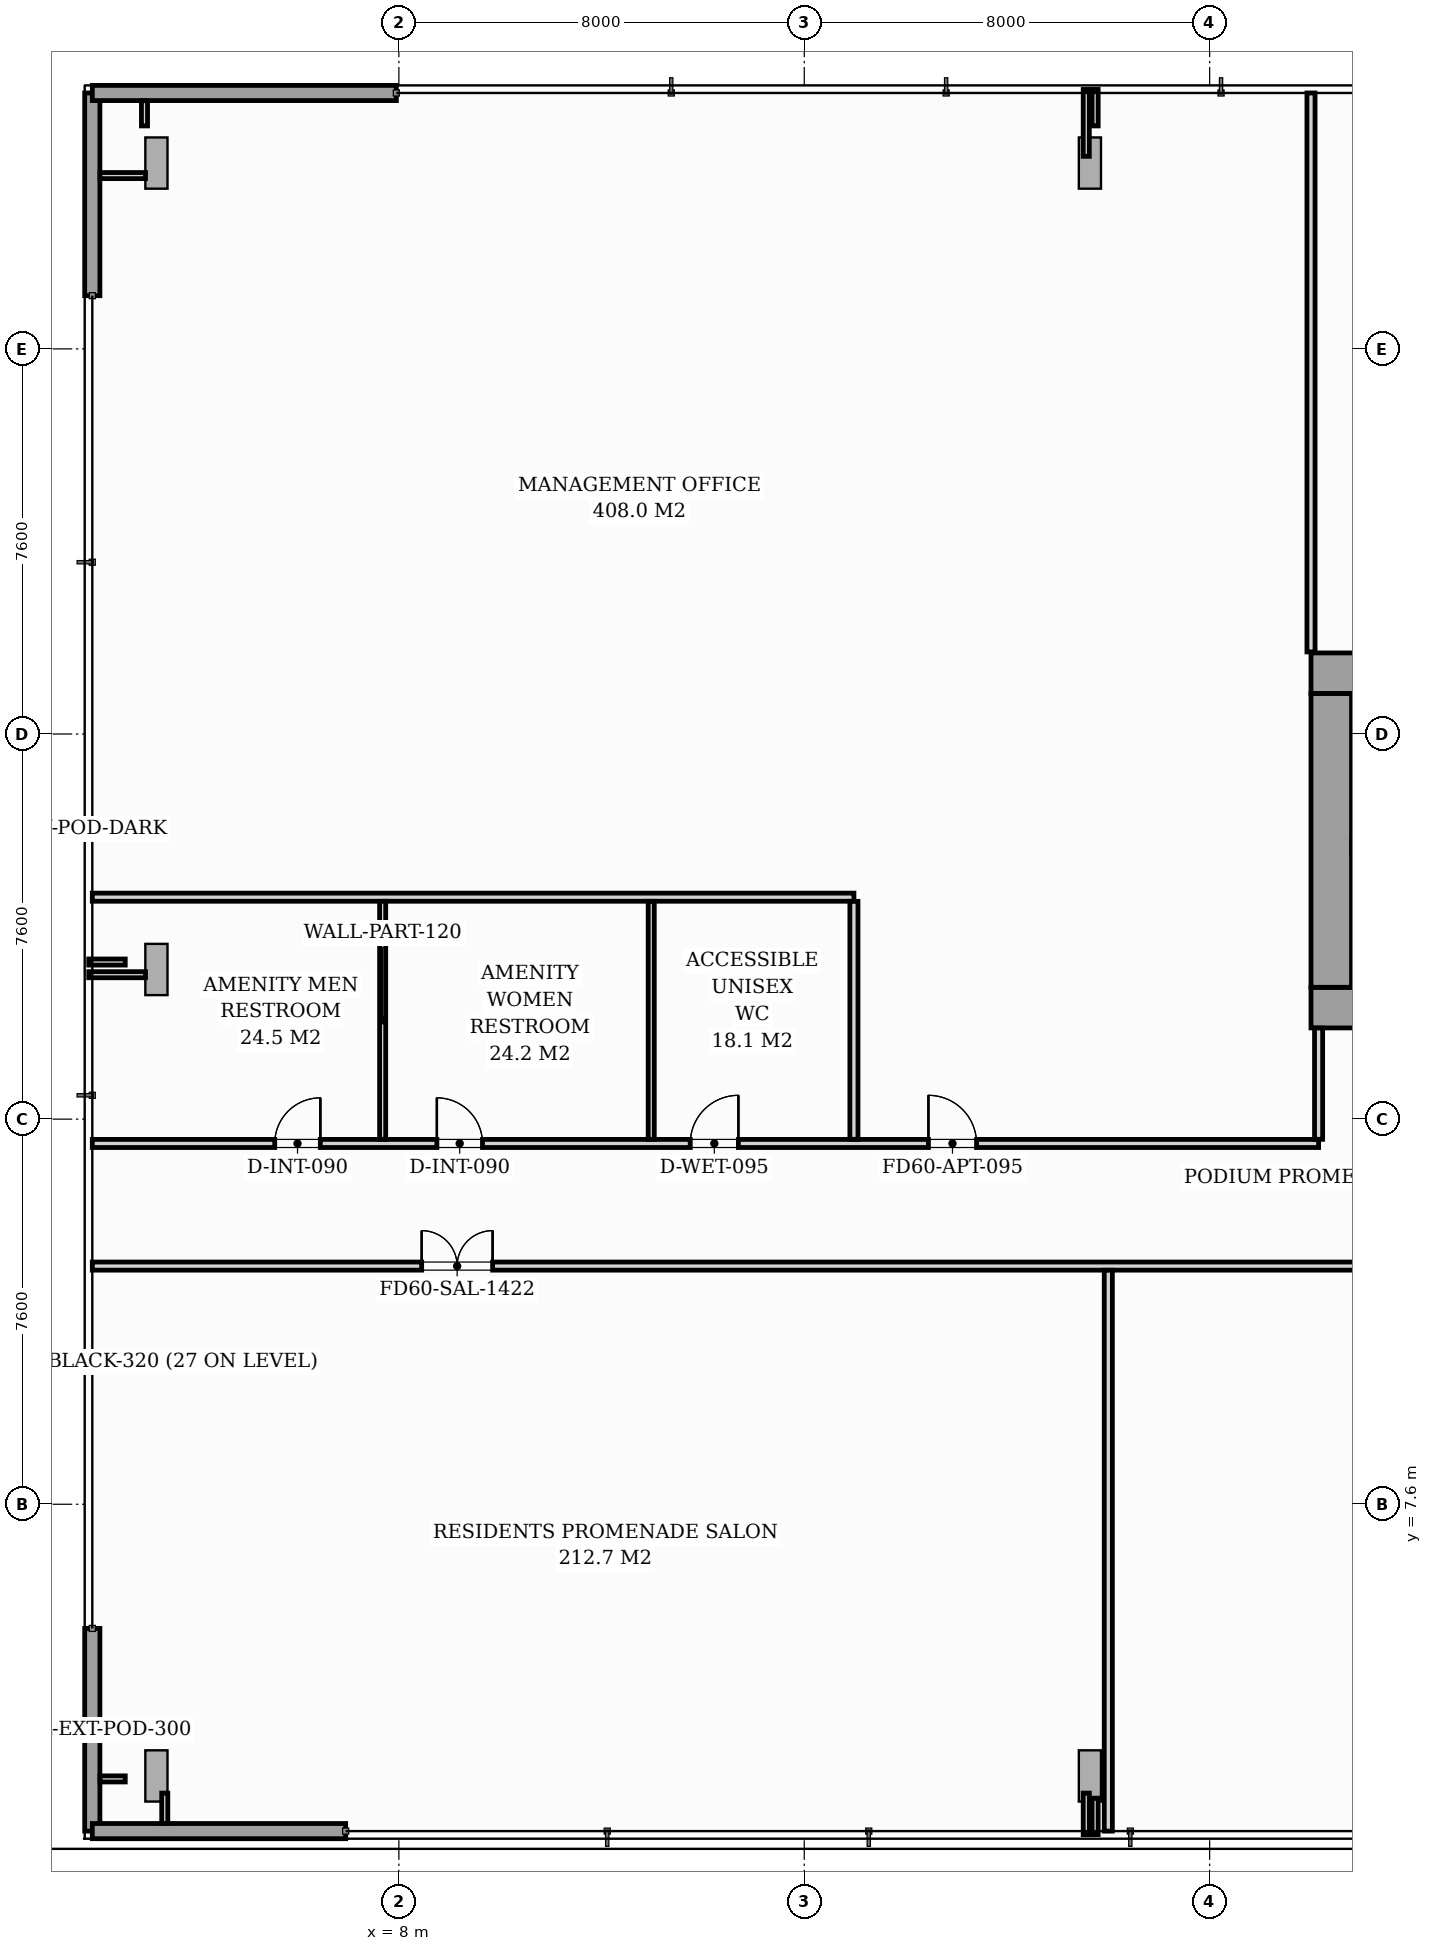
"""IFC4 building model, lengths in metres.
Left out: names, types, materials, properties, quantities, classifications, styles, units other than length and angle.
Written with IfcOpenShell. Run it as: python <this file> out.ifc"""

import sys

from ifc_helpers import new_model, si_unit, direction, frame, frame_2d, origin, origin_2d, place, context, subcontext, project, spatial, rectangle, i_section, extrude, source, transform, mapped, element, fill, save


model = new_model("IFC4")
c1 = context("Model", 3, precision=1e-05, world=origin(), true_north=direction((0.0, 1.0)))
c2 = subcontext(c1, "Body", "Model", "MODEL_VIEW")
j1 = project(units=[si_unit("LENGTHUNIT", "METRE"), si_unit("PLANEANGLEUNIT", "RADIAN")], contexts=[c1])
p1 = place(None, origin())
s1 = spatial("IfcSite", under=j1, at=p1, CompositionType="ELEMENT")
p2 = place(p1, origin())
s2 = spatial("IfcBuilding", under=s1, at=p2, CompositionType="ELEMENT")
p3 = place(p2, frame((0.0, 0.0, 5.0)))
s3 = spatial("IfcBuildingStorey", under=s2, at=p3, CompositionType="ELEMENT", Elevation=5.0)
m1 = source(origin(), c2, "Body", "SweptSolid", [
    extrude(i_section(OverallWidth=0.437, OverallDepth=0.514, WebThickness=0.061, FlangeThickness=0.097, FilletRadius=0.018, at=origin_2d()), origin(), (0.0, 0.0, 1.0), 4.496),
])
for number, where, z_axis, x_axis in (
    (1, (26.4, 17.4, 0.002), (0.0, 0.0, 1.0), (1.0, 0.0, 0.0)),
    (2, (26.4, 24.0, 0.002), (0.0, 0.0, 1.0), (1.0, 0.0, 0.0)),
):
    element("IfcColumn", number, at=place(p3, frame(where, z_axis=z_axis, x_axis=x_axis)), inside=s3, PredefinedType="PILASTER", context=c2, shape_type="MappedRepresentation", body=[
        mapped(m1, transform((0.0, 0.0, 0.0), scale=1.0)),
    ])
m2 = source(origin(), c2, "Body", "SweptSolid", [
    extrude(i_section(OverallWidth=0.438, OverallDepth=1.011, WebThickness=0.041, FlangeThickness=0.074, FilletRadius=0.024, at=origin_2d()), origin(), (0.0, 0.0, 1.0), 4.05),
])
p4 = place(p3, frame((2.991, 2.183, 0.055), z_axis=(0.192259373615, 0.04804977133, 0.980167104494), x_axis=(-0.950919303155, -0.237655278964, 0.198172771257)))
e3 = element("IfcColumn", 3, at=p4, inside=s3, PredefinedType="COLUMN", context=c2, shape_type="MappedRepresentation", body=[
    mapped(m2, transform((0.0, 0.0, 0.0), scale=1.0)),
])
m3 = source(origin(), c2, "Body", "SweptSolid", [
    extrude(i_section(OverallWidth=0.438, OverallDepth=1.011, WebThickness=0.041, FlangeThickness=0.074, FilletRadius=0.024, at=origin_2d()), origin(), (0.0, 0.0, 1.0), 4.032),
])
p5 = place(p3, frame((21.737, 2.182, 0.033), z_axis=(-0.085366370454, 0.048798081266, 0.995153922798), x_axis=(0.863960144879, -0.493866579271, 0.098329395095)))
e4 = element("IfcColumn", 4, at=p5, inside=s3, PredefinedType="COLUMN", context=c2, shape_type="MappedRepresentation", body=[
    mapped(m3, transform((0.0, 0.0, 0.0), scale=1.0)),
])
m4 = source(origin(), c2, "Body", "SweptSolid", [
    extrude(i_section(OverallWidth=0.438, OverallDepth=1.011, WebThickness=0.041, FlangeThickness=0.074, FilletRadius=0.024, at=origin_2d()), origin(), (0.0, 0.0, 1.0), 4.147),
])
p6 = place(p3, frame((2.997, 34.395, 0.085), z_axis=(0.184904801309, -0.277268899766, 0.942831995467), x_axis=(-0.523104384662, 0.784406765921, 0.333268402829)))
e5 = element("IfcColumn", 5, at=p6, inside=s3, PredefinedType="COLUMN", context=c2, shape_type="MappedRepresentation", body=[
    mapped(m4, transform((0.0, 0.0, 0.0), scale=1.0)),
])
m5 = source(origin(), c2, "Body", "SweptSolid", [
    extrude(i_section(OverallWidth=0.438, OverallDepth=1.011, WebThickness=0.041, FlangeThickness=0.074, FilletRadius=0.024, at=origin_2d()), origin(), (0.0, 0.0, 1.0), 4.108),
])
p7 = place(p3, frame((21.733, 34.398, 0.076), z_axis=(-0.08201510328, -0.281228600523, 0.956129696789), x_axis=(0.267686520286, 0.917893198547, 0.292943685574)))
e6 = element("IfcColumn", 6, at=p7, inside=s3, PredefinedType="COLUMN", context=c2, shape_type="MappedRepresentation", body=[
    mapped(m5, transform((0.0, 0.0, 0.0), scale=1.0)),
])
m6 = source(origin(), c2, "Body", "SweptSolid", [
    extrude(i_section(OverallWidth=0.438, OverallDepth=1.011, WebThickness=0.041, FlangeThickness=0.074, FilletRadius=0.024, at=origin_2d()), origin(), (0.0, 0.0, 1.0), 4.062),
])
p8 = place(p3, frame((2.992, 18.292, 0.061), z_axis=(0.191071642999, -0.119367185591, 0.974291076756), x_axis=(-0.826299381934, 0.516209679937, 0.225292915455)))
e7 = element("IfcColumn", 7, at=p8, inside=s3, PredefinedType="COLUMN", context=c2, shape_type="MappedRepresentation", body=[
    mapped(m6, transform((0.0, 0.0, 0.0), scale=1.0)),
])
for number, where, z_axis, x_axis in (
    (8, (1.95, 1.15, 0.0), (0.0, 0.0, 1.0), (0.0, 1.0, 0.0)),
    (9, (1.95, 31.45, 0.0), (0.0, 0.0, 1.0), (0.0, 1.0, 0.0)),
):
    element("IfcWall", number, at=place(p3, frame(where, z_axis=z_axis, x_axis=x_axis)), inside=s3, PredefinedType="STANDARD", context=c2, shape_type="SweptSolid", body=[
        extrude(rectangle(XDim=4.0, YDim=0.3, at=frame_2d((2.0, 0.0))), origin(), (0.0, 0.0, 1.0), 4.08),
    ])
p9 = place(p3, frame((1.95, 35.45, 0.0), z_axis=(0.0, 0.0, 1.0), x_axis=(1.0, 0.0, 0.0)))
e10 = element("IfcWall", 10, at=p9, inside=s3, PredefinedType="STANDARD", context=c2, shape_type="SweptSolid", body=[
    extrude(rectangle(XDim=6.0, YDim=0.3, at=frame_2d((3.0, 0.0))), origin(), (0.0, 0.0, 1.0), 4.08),
])
p10 = place(p3, frame((6.95, 1.15, 0.0), z_axis=(0.0, 0.0, 1.0), x_axis=(-1.0, 0.0, 0.0)))
e11 = element("IfcWall", 11, at=p10, inside=s3, PredefinedType="STANDARD", context=c2, shape_type="SweptSolid", body=[
    extrude(rectangle(XDim=5.0, YDim=0.3, at=frame_2d((2.5, 0.0))), origin(), (0.0, 0.0, 1.0), 4.08),
])
p11 = place(p3, frame((26.0, 17.4, 0.0), z_axis=(0.0, 0.0, 1.0), x_axis=(1.0, 0.0, 0.0)))
e12 = element("IfcWall", 12, at=p11, inside=s3, PredefinedType="SHEAR", context=c2, shape_type="SweptSolid", body=[
    extrude(rectangle(XDim=20.0, YDim=0.8, at=frame_2d((10.0, 0.0))), origin(), (0.0, 0.0, 1.0), 4.5),
])
p12 = place(p11, frame((1.15, 0.0, 0.0)))
e13 = element("IfcOpeningElement", 13, at=p12, cuts=e12, PredefinedType="OPENING", context=c2, shape_type="SweptSolid", body=[
    extrude(rectangle(XDim=0.95, YDim=2.06, at=frame_2d((0.475, 1.03))), frame((0.0, 0.41, 0.0), z_axis=(0.0, -1.0, 0.0), x_axis=(1.0, 0.0, 0.0)), (0.0, 0.0, 1.0), 0.82),
])
p13 = place(p11, frame((9.58, 0.0, 0.0)))
e14 = element("IfcOpeningElement", 14, at=p13, cuts=e12, PredefinedType="OPENING", context=c2, shape_type="SweptSolid", body=[
    extrude(rectangle(XDim=0.9, YDim=2.06, at=frame_2d((0.45, 1.03))), frame((0.0, 0.41, 0.0), z_axis=(0.0, -1.0, 0.0), x_axis=(1.0, 0.0, 0.0)), (0.0, 0.0, 1.0), 0.82),
])
p14 = place(p11, frame((17.75, 0.0, 0.0)))
e15 = element("IfcOpeningElement", 15, at=p14, cuts=e12, PredefinedType="OPENING", context=c2, shape_type="SweptSolid", body=[
    extrude(rectangle(XDim=0.95, YDim=2.06, at=frame_2d((0.475, 1.03))), frame((0.0, 0.41, 0.0), z_axis=(0.0, -1.0, 0.0), x_axis=(1.0, 0.0, 0.0)), (0.0, 0.0, 1.0), 0.82),
])
p15 = place(p3, frame((26.0, 24.0, 0.0), z_axis=(0.0, 0.0, 1.0), x_axis=(1.0, 0.0, 0.0)))
e16 = element("IfcWall", 16, at=p15, inside=s3, PredefinedType="SHEAR", context=c2, shape_type="SweptSolid", body=[
    extrude(rectangle(XDim=20.0, YDim=0.8, at=frame_2d((10.0, 0.0))), origin(), (0.0, 0.0, 1.0), 4.5),
])
p16 = place(p3, frame((26.4, 17.802, 0.0), z_axis=(0.0, 0.0, 1.0), x_axis=(0.0, 1.0, 0.0)))
e17 = element("IfcWall", 17, at=p16, inside=s3, PredefinedType="SHEAR", context=c2, shape_type="SweptSolid", body=[
    extrude(rectangle(XDim=5.796, YDim=0.8, at=frame_2d((2.898, 0.0))), origin(), (0.0, 0.0, 1.0), 4.5),
])
p17 = place(p3, frame((1.95, 12.3, 0.0), z_axis=(0.0, 0.0, 1.0), x_axis=(1.0, 0.0, 0.0)))
e18 = element("IfcWall", 18, at=p17, inside=s3, PredefinedType="PARTITIONING", context=c2, shape_type="SweptSolid", body=[
    extrude(rectangle(XDim=76.948, YDim=0.16, at=frame_2d((38.474, 0.0))), origin(), (0.0, 0.0, 1.0), 4.08),
])
p18 = place(p17, frame((6.5, 0.0, 0.0)))
e19 = element("IfcOpeningElement", 19, at=p18, cuts=e18, PredefinedType="OPENING", context=c2, shape_type="SweptSolid", body=[
    extrude(rectangle(XDim=1.4, YDim=2.08, at=frame_2d((0.7, 1.04))), frame((0.0, 0.09, 0.0), z_axis=(0.0, -1.0, 0.0), x_axis=(1.0, 0.0, 0.0)), (0.0, 0.0, 1.0), 0.18),
])
p19 = place(p17, frame((28.0, 0.0, 0.0)))
e20 = element("IfcOpeningElement", 20, at=p19, cuts=e18, PredefinedType="OPENING", context=c2, shape_type="SweptSolid", body=[
    extrude(rectangle(XDim=1.4, YDim=2.08, at=frame_2d((0.7, 1.04))), frame((0.0, 0.09, 0.0), z_axis=(0.0, -1.0, 0.0), x_axis=(1.0, 0.0, 0.0)), (0.0, 0.0, 1.0), 0.18),
])
p20 = place(p3, frame((1.95, 14.72, 0.0), z_axis=(0.0, 0.0, 1.0), x_axis=(1.0, 0.0, 0.0)))
e21 = element("IfcWall", 21, at=p20, inside=s3, PredefinedType="PARTITIONING", context=c2, shape_type="SweptSolid", body=[
    extrude(rectangle(XDim=24.2, YDim=0.16, at=frame_2d((12.1, 0.0))), origin(), (0.0, 0.0, 1.0), 4.08),
])
p21 = place(p20, frame((16.5, 0.0, 0.0)))
e22 = element("IfcOpeningElement", 22, at=p21, cuts=e21, PredefinedType="OPENING", context=c2, shape_type="SweptSolid", body=[
    extrude(rectangle(XDim=0.95, YDim=2.06, at=frame_2d((0.475, 1.03))), frame((0.0, 0.09, 0.0), z_axis=(0.0, -1.0, 0.0), x_axis=(1.0, 0.0, 0.0)), (0.0, 0.0, 1.0), 0.18),
])
p22 = place(p20, frame((3.6, 0.0, 0.0)))
e23 = element("IfcOpeningElement", 23, at=p22, cuts=e21, PredefinedType="OPENING", context=c2, shape_type="SweptSolid", body=[
    extrude(rectangle(XDim=0.9, YDim=2.05, at=frame_2d((0.45, 1.025))), frame((0.0, 0.09, 0.0), z_axis=(0.0, -1.0, 0.0), x_axis=(1.0, 0.0, 0.0)), (0.0, 0.0, 1.0), 0.18),
])
p23 = place(p20, frame((6.8, 0.0, 0.0)))
e24 = element("IfcOpeningElement", 24, at=p23, cuts=e21, PredefinedType="OPENING", context=c2, shape_type="SweptSolid", body=[
    extrude(rectangle(XDim=0.9, YDim=2.05, at=frame_2d((0.45, 1.025))), frame((0.0, 0.09, 0.0), z_axis=(0.0, -1.0, 0.0), x_axis=(1.0, 0.0, 0.0)), (0.0, 0.0, 1.0), 0.18),
])
p24 = place(p20, frame((11.8, 0.0, 0.0)))
e25 = element("IfcOpeningElement", 25, at=p24, cuts=e21, PredefinedType="OPENING", context=c2, shape_type="SweptSolid", body=[
    extrude(rectangle(XDim=0.95, YDim=2.1, at=frame_2d((0.475, 1.05))), frame((0.0, 0.09, 0.0), z_axis=(0.0, -1.0, 0.0), x_axis=(1.0, 0.0, 0.0)), (0.0, 0.0, 1.0), 0.18),
])
p25 = place(p3, frame((22.0, 1.15, 0.0), z_axis=(0.0, 0.0, 1.0), x_axis=(0.0, 1.0, 0.0)))
e26 = element("IfcWall", 26, at=p25, inside=s3, PredefinedType="PARTITIONING", context=c2, shape_type="SweptSolid", body=[
    extrude(rectangle(XDim=11.068, YDim=0.16, at=frame_2d((5.534, 0.0))), origin(), (0.0, 0.0, 1.0), 4.08),
])
p26 = place(p3, frame((1.95, 19.58, 0.0), z_axis=(0.0, 0.0, 1.0), x_axis=(1.0, 0.0, 0.0)))
e27 = element("IfcWall", 27, at=p26, inside=s3, PredefinedType="PARTITIONING", context=c2, shape_type="SweptSolid", body=[
    extrude(rectangle(XDim=15.03, YDim=0.16, at=frame_2d((7.515, 0.0))), origin(), (0.0, 0.0, 1.0), 4.08),
])
for number, where, z_axis, x_axis in (
    (28, (7.68, 14.802, 0.0), (0.0, 0.0, 1.0), (0.0, 1.0, 0.0)),
    (29, (12.98, 14.802, 0.0), (0.0, 0.0, 1.0), (0.0, 1.0, 0.0)),
):
    element("IfcWall", number, at=place(p3, frame(where, z_axis=z_axis, x_axis=x_axis)), inside=s3, PredefinedType="PARTITIONING", context=c2, shape_type="SweptSolid", body=[
        extrude(rectangle(XDim=4.696, YDim=0.12, at=frame_2d((2.348, 0.0))), origin(), (0.0, 0.0, 1.0), 4.08),
    ])
p27 = place(p3, frame((16.98, 14.802, 0.0), z_axis=(0.0, 0.0, 1.0), x_axis=(0.0, 1.0, 0.0)))
e30 = element("IfcWall", 30, at=p27, inside=s3, PredefinedType="PARTITIONING", context=c2, shape_type="SweptSolid", body=[
    extrude(rectangle(XDim=4.696, YDim=0.16, at=frame_2d((2.348, 0.0))), origin(), (0.0, 0.0, 1.0), 4.08),
])
p28 = place(p3, frame((26.0, 24.42, 0.0), z_axis=(0.0, 0.0, 1.0), x_axis=(0.0, 1.0, 0.0)))
e31 = element("IfcWall", 31, at=p28, inside=s3, PredefinedType="PARTITIONING", context=c2, shape_type="SweptSolid", body=[
    extrude(rectangle(XDim=11.03, YDim=0.16, at=frame_2d((5.515, 0.0))), origin(), (0.0, 0.0, 1.0), 4.08),
])
p29 = place(p3, frame((26.15, 14.802, 0.0), z_axis=(0.0, 0.0, 1.0), x_axis=(0.0, 1.0, 0.0)))
e32 = element("IfcWall", 32, at=p29, inside=s3, PredefinedType="PARTITIONING", context=c2, shape_type="SweptSolid", body=[
    extrude(rectangle(XDim=2.196, YDim=0.16, at=frame_2d((1.098, 0.0))), origin(), (0.0, 0.0, 1.0), 4.08),
])
p30 = place(p3, frame((3.38, 1.9, 0.0), z_axis=(0.0, 0.0, 1.0), x_axis=(0.0, -1.0, 0.0)))
e33 = element("IfcWall", 33, at=p30, inside=s3, PredefinedType="PARTITIONING", context=c2, shape_type="SweptSolid", body=[
    extrude(rectangle(XDim=0.598, YDim=0.12, at=frame_2d((0.299, 0.0))), origin(), (0.0, 0.0, 1.0), 4.08),
])
p31 = place(p3, frame((21.565, 1.9, 0.0), z_axis=(0.0, 0.0, 1.0), x_axis=(0.0, -1.0, 0.0)))
e34 = element("IfcWall", 34, at=p31, inside=s3, PredefinedType="PARTITIONING", context=c2, shape_type="SweptSolid", body=[
    extrude(rectangle(XDim=0.82, YDim=0.12, at=frame_2d((0.41, 0.0))), origin(), (0.0, 0.0, 1.0), 4.08),
])
p32 = place(p3, frame((3.0, 33.82, 0.0), z_axis=(0.0, 0.0, 1.0), x_axis=(-1.0, 0.0, 0.0)))
e35 = element("IfcWall", 35, at=p32, inside=s3, PredefinedType="PARTITIONING", context=c2, shape_type="SweptSolid", body=[
    extrude(rectangle(XDim=0.898, YDim=0.12, at=frame_2d((0.449, 0.0))), origin(), (0.0, 0.0, 1.0), 4.08),
])
p33 = place(p3, frame((21.565, 34.2, 0.0), z_axis=(0.0, 0.0, 1.0), x_axis=(0.0, 1.0, 0.0)))
e36 = element("IfcWall", 36, at=p33, inside=s3, PredefinedType="PARTITIONING", context=c2, shape_type="SweptSolid", body=[
    extrude(rectangle(XDim=1.32, YDim=0.12, at=frame_2d((0.66, 0.0))), origin(), (0.0, 0.0, 1.0), 4.08),
])
p34 = place(p3, frame((3.0, 18.05, 0.0), z_axis=(0.0, 0.0, 1.0), x_axis=(-1.0, 0.0, 0.0)))
e37 = element("IfcWall", 37, at=p34, inside=s3, PredefinedType="PARTITIONING", context=c2, shape_type="SweptSolid", body=[
    extrude(rectangle(XDim=1.12, YDim=0.12, at=frame_2d((0.56, 0.0))), origin(), (0.0, 0.0, 1.0), 4.08),
])
p35 = place(p3, frame((2.6, 2.18, 0.0), z_axis=(0.0, 0.0, 1.0), x_axis=(-1.0, 0.0, 0.0)))
e38 = element("IfcWall", 38, at=p35, inside=s3, PredefinedType="PARTITIONING", context=c2, shape_type="SweptSolid", body=[
    extrude(rectangle(XDim=0.498, YDim=0.12, at=frame_2d((0.249, 0.0))), origin(), (0.0, 0.0, 1.0), 4.08),
])
p36 = place(p3, frame((21.74, 1.8, 0.0), z_axis=(0.0, 0.0, 1.0), x_axis=(0.0, -1.0, 0.0)))
e39 = element("IfcWall", 39, at=p36, inside=s3, PredefinedType="PARTITIONING", context=c2, shape_type="SweptSolid", body=[
    extrude(rectangle(XDim=0.72, YDim=0.12, at=frame_2d((0.36, 0.0))), origin(), (0.0, 0.0, 1.0), 4.08),
])
p37 = place(p3, frame((2.98, 34.8, 0.0), z_axis=(0.0, 0.0, 1.0), x_axis=(0.0, 1.0, 0.0)))
e40 = element("IfcWall", 40, at=p37, inside=s3, PredefinedType="PARTITIONING", context=c2, shape_type="SweptSolid", body=[
    extrude(rectangle(XDim=0.498, YDim=0.12, at=frame_2d((0.249, 0.0))), origin(), (0.0, 0.0, 1.0), 4.08),
])
p38 = place(p3, frame((21.74, 34.8, 0.0), z_axis=(0.0, 0.0, 1.0), x_axis=(0.0, 1.0, 0.0)))
e41 = element("IfcWall", 41, at=p38, inside=s3, PredefinedType="PARTITIONING", context=c2, shape_type="SweptSolid", body=[
    extrude(rectangle(XDim=0.72, YDim=0.12, at=frame_2d((0.36, 0.0))), origin(), (0.0, 0.0, 1.0), 4.08),
])
p39 = place(p3, frame((2.6, 18.3, 0.0), z_axis=(0.0, 0.0, 1.0), x_axis=(-1.0, 0.0, 0.0)))
e42 = element("IfcWall", 42, at=p39, inside=s3, PredefinedType="PARTITIONING", context=c2, shape_type="SweptSolid", body=[
    extrude(rectangle(XDim=0.72, YDim=0.12, at=frame_2d((0.36, 0.0))), origin(), (0.0, 0.0, 1.0), 4.08),
])
m7 = source(origin(), c2, "Body", "SweptSolid", [
    extrude(rectangle(XDim=1.4, YDim=2.08, at=frame_2d((0.7, 1.04))), frame((0.0, 0.025, 0.0), z_axis=(0.0, -1.0, 0.0), x_axis=(1.0, 0.0, 0.0)), (0.0, 0.0, 1.0), 0.05),
])
p40 = place(p18, origin())
e43 = element("IfcDoor", 43, at=p40, inside=s3, OperationType="DOUBLE_DOOR_SINGLE_SWING", PredefinedType="DOOR", context=c2, shape_type="MappedRepresentation", body=[
    mapped(m7, transform((0.0, 0.0, 0.0), scale=1.0)),
])
fill(e19, e43)
m8 = source(origin(), c2, "Body", "SweptSolid", [
    extrude(rectangle(XDim=0.95, YDim=2.06, at=frame_2d((0.475, 1.03))), frame((0.0, 0.025, 0.0), z_axis=(0.0, -1.0, 0.0), x_axis=(1.0, 0.0, 0.0)), (0.0, 0.0, 1.0), 0.05),
])
p41 = place(p21, origin())
e44 = element("IfcDoor", 44, at=p41, inside=s3, OperationType="SINGLE_SWING_LEFT", PredefinedType="DOOR", context=c2, shape_type="MappedRepresentation", body=[
    mapped(m8, transform((0.0, 0.0, 0.0), scale=1.0)),
])
fill(e22, e44)
m9 = source(origin(), c2, "Body", "SweptSolid", [
    extrude(rectangle(XDim=0.9, YDim=2.05, at=frame_2d((0.45, 1.025))), frame((0.0, 0.025, 0.0), z_axis=(0.0, -1.0, 0.0), x_axis=(1.0, 0.0, 0.0)), (0.0, 0.0, 1.0), 0.05),
])
p42 = place(p22, origin())
e45 = element("IfcDoor", 45, at=p42, inside=s3, OperationType="SINGLE_SWING_RIGHT", PredefinedType="DOOR", context=c2, shape_type="MappedRepresentation", body=[
    mapped(m9, transform((0.0, 0.0, 0.0), scale=1.0)),
])
fill(e23, e45)
p43 = place(p23, origin())
e46 = element("IfcDoor", 46, at=p43, inside=s3, OperationType="SINGLE_SWING_LEFT", PredefinedType="DOOR", context=c2, shape_type="MappedRepresentation", body=[
    mapped(m9, transform((0.0, 0.0, 0.0), scale=1.0)),
])
fill(e24, e46)
m10 = source(origin(), c2, "Body", "SweptSolid", [
    extrude(rectangle(XDim=0.95, YDim=2.1, at=frame_2d((0.475, 1.05))), frame((0.0, 0.025, 0.0), z_axis=(0.0, -1.0, 0.0), x_axis=(1.0, 0.0, 0.0)), (0.0, 0.0, 1.0), 0.05),
])
p44 = place(p24, origin())
e47 = element("IfcDoor", 47, at=p44, inside=s3, OperationType="SINGLE_SWING_RIGHT", PredefinedType="DOOR", context=c2, shape_type="MappedRepresentation", body=[
    mapped(m10, transform((0.0, 0.0, 0.0), scale=1.0)),
])
fill(e25, e47)
save(model, sys.argv[1])
